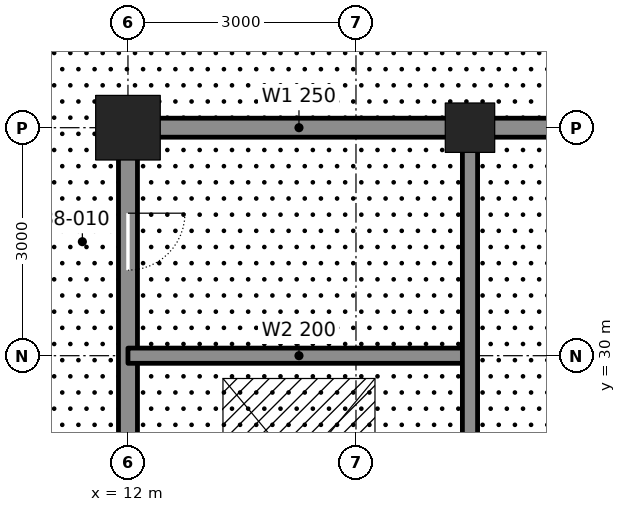
"""IFC4 building model, lengths in metres.
Left out: names, types, materials, properties, quantities, classifications, styles, units other than length and angle.
Written with IfcOpenShell. Run it as: python <this file> out.ifc"""

import sys

from ifc_helpers import new_model, si_unit, direction, frame, frame_2d, origin, origin_2d, place, context, subcontext, project, spatial, rectangle, hollow_rectangle, extrude, element, fill, save


model = new_model("IFC4")
c1 = context("Model", 3, precision=1e-05, world=origin(), true_north=direction((0.0, 1.0)))
c2 = subcontext(c1, "Body", "Model", "MODEL_VIEW")
j1 = project(units=[si_unit("LENGTHUNIT", "METRE"), si_unit("PLANEANGLEUNIT", "RADIAN")], contexts=[c1])
p1 = place(None, origin())
s1 = spatial("IfcSite", under=j1, at=p1, CompositionType="ELEMENT")
p2 = place(p1, origin())
s2 = spatial("IfcBuilding", under=s1, at=p2, CompositionType="ELEMENT")
p3 = place(p2, frame((0.0, 0.0, 174.0)))
s3 = spatial("IfcBuildingStorey", under=s2, at=p3, CompositionType="ELEMENT", Elevation=174.0)
p4 = place(p3, frame((12.0, 33.0, 0.0), z_axis=(0.0, 0.0, 1.0), x_axis=(1.0, 0.0, 0.0)))
e1 = element("IfcColumn", 1, at=p4, inside=s3, PredefinedType="COLUMN", context=c2, shape_type="SweptSolid", body=[
    extrude(hollow_rectangle(XDim=0.85, YDim=0.85, WallThickness=0.085, at=origin_2d()), origin(), (0.0, 0.0, 1.0), 6.0),
])
p5 = place(p3, frame((16.5, 33.0, 0.0), z_axis=(0.0, 0.0, 1.0), x_axis=(1.0, 0.0, 0.0)))
e2 = element("IfcColumn", 2, at=p5, inside=s3, PredefinedType="COLUMN", context=c2, shape_type="SweptSolid", body=[
    extrude(hollow_rectangle(XDim=0.65, YDim=0.65, WallThickness=0.065, at=origin_2d()), origin(), (0.0, 0.0, 1.0), 6.0),
])
p6 = place(p3, frame((12.0, 24.25, 0.0), z_axis=(0.0, 0.0, 1.0), x_axis=(0.0, 1.0, 0.0)))
e3 = element("IfcWall", 3, at=p6, inside=s3, PredefinedType="SOLIDWALL", context=c2, shape_type="SweptSolid", body=[
    extrude(rectangle(XDim=8.5, YDim=0.25, at=frame_2d((4.25, 0.0))), origin(), (0.0, 0.0, 1.0), 4.913),
])
p7 = place(p6, frame((0.65, 0.0, 0.0)))
e4 = element("IfcOpeningElement", 4, at=p7, cuts=e3, PredefinedType="OPENING", context=c2, shape_type="SweptSolid", body=[
    extrude(rectangle(XDim=1.2, YDim=2.1, at=frame_2d((0.6, 1.05))), frame((0.0, 0.135, 0.0), z_axis=(0.0, -1.0, 0.0), x_axis=(1.0, 0.0, 0.0)), (0.0, 0.0, 1.0), 0.27),
])
p8 = place(p6, frame((6.875, 0.0, 0.0)))
e5 = element("IfcOpeningElement", 5, at=p8, cuts=e3, PredefinedType="OPENING", context=c2, shape_type="SweptSolid", body=[
    extrude(rectangle(XDim=0.75, YDim=2.1, at=frame_2d((0.375, 1.05))), frame((0.0, 0.135, 0.0), z_axis=(0.0, -1.0, 0.0), x_axis=(1.0, 0.0, 0.0)), (0.0, 0.0, 1.0), 0.27),
])
p9 = place(p3, frame((12.0, 30.0, 0.0), z_axis=(0.0, 0.0, 1.0), x_axis=(1.0, 0.0, 0.0)))
e6 = element("IfcWall", 6, at=p9, inside=s3, PredefinedType="SOLIDWALL", context=c2, shape_type="SweptSolid", body=[
    extrude(rectangle(XDim=4.5, YDim=0.2, at=frame_2d((2.25, 0.0))), origin(), (0.0, 0.0, 1.0), 5.84),
])
p10 = place(p3, frame((12.25, 33.0, 0.0), z_axis=(0.0, 0.0, 1.0), x_axis=(1.0, 0.0, 0.0)))
e7 = element("IfcWall", 7, at=p10, inside=s3, PredefinedType="SOLIDWALL", context=c2, shape_type="SweptSolid", body=[
    extrude(rectangle(XDim=4.0, YDim=0.25, at=frame_2d((2.0, 0.0))), origin(), (0.0, 0.0, 1.0), 4.981),
])
p11 = place(p3, frame((16.75, 33.0, 0.0), z_axis=(0.0, 0.0, 1.0), x_axis=(1.0, 0.0, 0.0)))
e8 = element("IfcWall", 8, at=p11, inside=s3, PredefinedType="SOLIDWALL", context=c2, shape_type="SweptSolid", body=[
    extrude(rectangle(XDim=2.5, YDim=0.25, at=frame_2d((1.25, 0.0))), origin(), (0.0, 0.0, 1.0), 4.981),
])
p12 = place(p3, frame((16.5, 24.25, 0.0), z_axis=(0.0, 0.0, 1.0), x_axis=(0.0, 1.0, 0.0)))
e9 = element("IfcWall", 9, at=p12, inside=s3, PredefinedType="SOLIDWALL", context=c2, shape_type="SweptSolid", body=[
    extrude(rectangle(XDim=8.5, YDim=0.2, at=frame_2d((4.25, 0.0))), origin(), (0.0, 0.0, 1.0), 4.913),
])
p13 = place(p8, frame((0.75, 0.0, 0.0), z_axis=(0.0, 0.0, 1.0), x_axis=(-1.0, 0.0, 0.0)))
e10 = element("IfcDoor", 10, at=p13, inside=s3, OperationType="SINGLE_SWING_LEFT", PredefinedType="DOOR", context=c2, shape_type="SweptSolid", body=[
    extrude(rectangle(XDim=0.75, YDim=2.1, at=frame_2d((0.375, 1.05))), frame((0.0, 0.025, 0.0), z_axis=(0.0, -1.0, 0.0), x_axis=(1.0, 0.0, 0.0)), (0.0, 0.0, 1.0), 0.05),
])
fill(e5, e10)
save(model, sys.argv[1])
